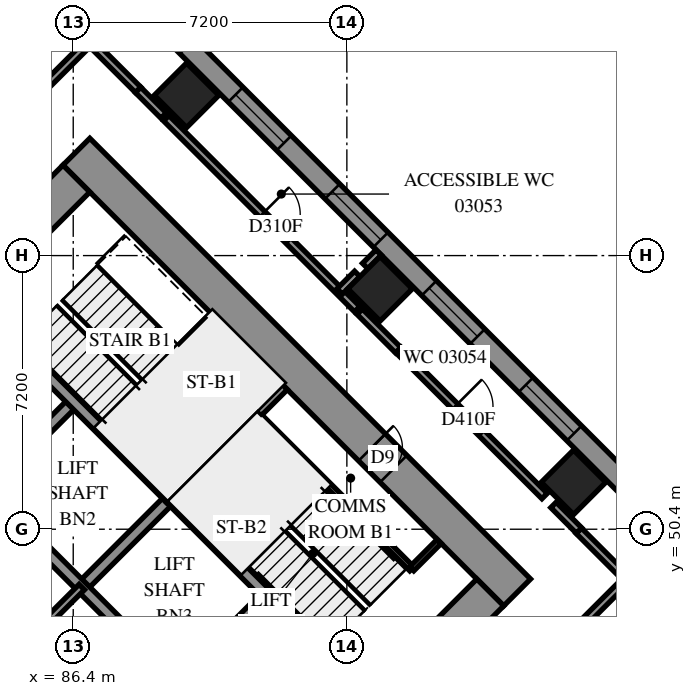
"""IFC4 building model, lengths in metres.
Left out: names, types, materials, properties, quantities, classifications, styles, units other than length and angle.
Written with IfcOpenShell. Run it as: python <this file> out.ifc"""

import sys

from ifc_helpers import new_model, si_unit, direction, frame, frame_2d, origin, origin_2d, place, context, subcontext, project, spatial, polyline, rectangle, outline, extrude, element, fill, save


model = new_model("IFC4")
c1 = context("Model", 3, precision=1e-05, world=origin(), true_north=direction((0.0, 1.0)))
c2 = subcontext(c1, "Body", "Model", "MODEL_VIEW")
j1 = project(units=[si_unit("LENGTHUNIT", "METRE"), si_unit("PLANEANGLEUNIT", "RADIAN")], contexts=[c1])
p1 = place(None, origin())
s1 = spatial("IfcSite", under=j1, at=p1, CompositionType="ELEMENT")
p2 = place(p1, origin())
s2 = spatial("IfcBuilding", under=s1, at=p2, CompositionType="ELEMENT")
p3 = place(p2, frame((0.0, 0.0, 14.4)))
s3 = spatial("IfcBuildingStorey", under=s2, at=p3, CompositionType="ELEMENT", Elevation=14.4)
for number, where, z_axis, x_axis in (
    (1, (89.382, 61.818, 0.0), (0.0, 0.0, 1.0), (0.707, -0.707, 0.0)),
    (2, (94.474, 56.727, 0.0), (0.0, 0.0, 1.0), (0.707, -0.707, 0.0)),
    (3, (99.565, 51.635, 0.0), (0.0, 0.0, 1.0), (0.707, -0.707, 0.0)),
):
    element("IfcColumn", number, at=place(p3, frame(where, z_axis=z_axis, x_axis=x_axis)), inside=s3, PredefinedType="COLUMN", context=c2, shape_type="SweptSolid", body=[
        extrude(rectangle(XDim=1.2, YDim=1.2, at=origin_2d()), origin(), (0.0, 0.0, 1.0), 3.8),
    ])
p4 = place(p3, frame((75.594, 49.443, -0.4), z_axis=(0.0, 0.0, 1.0), x_axis=(0.7071037324, -0.70710983, 0.0)))
e4 = element("IfcWall", 4, at=p4, inside=s3, PredefinedType="SHEAR", context=c2, shape_type="SweptSolid", body=[
    extrude(rectangle(XDim=16.4, YDim=1.0, at=frame_2d((8.2, 0.0))), origin(), (0.0, 0.0, 1.0), 3.5),
])
p5 = place(p3, frame((86.483, 60.333, -0.4), z_axis=(0.0, 0.0, 1.0), x_axis=(0.70710983, -0.7071037324, 0.0)))
e5 = element("IfcWall", 5, at=p5, inside=s3, PredefinedType="SHEAR", context=c2, shape_type="SweptSolid", body=[
    extrude(rectangle(XDim=16.4, YDim=1.0, at=frame_2d((8.2, 0.0))), origin(), (0.0, 0.0, 1.0), 3.5),
])
p6 = place(p5, frame((11.0, 0.0, 0.4)))
e6 = element("IfcOpeningElement", 6, at=p6, cuts=e5, PredefinedType="OPENING", context=c2, shape_type="SweptSolid", body=[
    extrude(rectangle(XDim=0.8, YDim=2.1, at=frame_2d((0.4, 1.05))), frame((0.0, 0.51, 0.0), z_axis=(0.0, -1.0, 0.0), x_axis=(1.0, 0.0, 0.0)), (0.0, 0.0, 1.0), 1.02),
])
p7 = place(p3, frame((76.301, 49.443, -0.4), z_axis=(0.0, 0.0, 1.0), x_axis=(0.7071067812, 0.7071067812, 0.0)))
e7 = element("IfcWall", 7, at=p7, inside=s3, PredefinedType="SHEAR", context=c2, shape_type="SweptSolid", body=[
    extrude(rectangle(XDim=14.4, YDim=1.0, at=frame_2d((7.2, 0.0))), origin(), (0.0, 0.0, 1.0), 3.5),
])
p8 = place(p7, frame((4.55, 0.0, 0.4)))
e8 = element("IfcOpeningElement", 8, at=p8, cuts=e7, PredefinedType="OPENING", context=c2, shape_type="SweptSolid", body=[
    extrude(rectangle(XDim=1.1, YDim=2.1, at=frame_2d((0.55, 1.05))), frame((0.0, 0.51, 0.0), z_axis=(0.0, -1.0, 0.0), x_axis=(1.0, 0.0, 0.0)), (0.0, 0.0, 1.0), 1.02),
])
p9 = place(p7, frame((11.35, 0.0, 0.4)))
e9 = element("IfcOpeningElement", 9, at=p9, cuts=e7, PredefinedType="OPENING", context=c2, shape_type="SweptSolid", body=[
    extrude(rectangle(XDim=1.1, YDim=2.1, at=frame_2d((0.55, 1.05))), frame((0.0, 0.51, 0.0), z_axis=(0.0, -1.0, 0.0), x_axis=(1.0, 0.0, 0.0)), (0.0, 0.0, 1.0), 1.02),
])
p10 = place(p3, frame((87.19, 38.554, -0.4), z_axis=(0.0, 0.0, 1.0), x_axis=(0.707103309, 0.7071102534, 0.0)))
e10 = element("IfcWall", 10, at=p10, inside=s3, PredefinedType="SHEAR", context=c2, shape_type="SweptSolid", body=[
    extrude(rectangle(XDim=14.4, YDim=1.0, at=frame_2d((7.2, 0.0))), origin(), (0.0, 0.0, 1.0), 3.5),
])
p11 = place(p10, frame((4.55, 0.0, 0.4)))
e11 = element("IfcOpeningElement", 11, at=p11, cuts=e10, PredefinedType="OPENING", context=c2, shape_type="SweptSolid", body=[
    extrude(rectangle(XDim=1.1, YDim=2.1, at=frame_2d((0.55, 1.05))), frame((0.0, 0.51, 0.0), z_axis=(0.0, -1.0, 0.0), x_axis=(1.0, 0.0, 0.0)), (0.0, 0.0, 1.0), 1.02),
])
p12 = place(p10, frame((11.35, 0.0, 0.4)))
e12 = element("IfcOpeningElement", 12, at=p12, cuts=e10, PredefinedType="OPENING", context=c2, shape_type="SweptSolid", body=[
    extrude(rectangle(XDim=1.1, YDim=2.1, at=frame_2d((0.55, 1.05))), frame((0.0, 0.51, 0.0), z_axis=(0.0, -1.0, 0.0), x_axis=(1.0, 0.0, 0.0)), (0.0, 0.0, 1.0), 1.02),
])
p13 = place(p3, frame((84.079, 51.423, 0.0), z_axis=(0.0, 0.0, 1.0), x_axis=(0.7071219326, 0.7070916295, 0.0)))
e13 = element("IfcWall", 13, at=p13, inside=s3, PredefinedType="SOLIDWALL", context=c2, shape_type="SweptSolid", body=[
    extrude(rectangle(XDim=3.3, YDim=0.3, at=frame_2d((1.65, 0.0))), origin(), (0.0, 0.0, 1.0), 3.8),
])
for number, where, z_axis, x_axis in (
    (14, (86.625, 48.878, 0.0), (0.0, 0.0, 1.0), (0.707, 0.707, 0.0)),
    (15, (89.17, 46.332, 0.0), (0.0, 0.0, 1.0), (0.707, 0.707, 0.0)),
):
    element("IfcWall", number, at=place(p3, frame(where, z_axis=z_axis, x_axis=x_axis)), inside=s3, PredefinedType="SOLIDWALL", context=c2, shape_type="SweptSolid", body=[
        extrude(rectangle(XDim=3.3, YDim=0.3, at=frame_2d((1.65, 0.0))), origin(), (0.0, 0.0, 1.0), 3.8),
    ])
p14 = place(p3, frame((78.988, 51.423, 0.0), z_axis=(0.0, 0.0, 1.0), x_axis=(0.7071067812, -0.7071067812, 0.0)))
e16 = element("IfcWall", 16, at=p14, inside=s3, PredefinedType="SOLIDWALL", context=c2, shape_type="SweptSolid", body=[
    extrude(rectangle(XDim=14.4, YDim=0.3, at=frame_2d((7.2, 0.0))), origin(), (0.0, 0.0, 1.0), 3.8),
])
p15 = place(p14, frame((1.25, 0.0, 0.0)))
e17 = element("IfcOpeningElement", 17, at=p15, cuts=e16, PredefinedType="OPENING", context=c2, shape_type="SweptSolid", body=[
    extrude(rectangle(XDim=1.1, YDim=2.1, at=frame_2d((0.55, 1.05))), frame((0.0, 0.16, 0.0), z_axis=(0.0, -1.0, 0.0), x_axis=(1.0, 0.0, 0.0)), (0.0, 0.0, 1.0), 0.32),
])
p16 = place(p14, frame((4.85, 0.0, 0.0)))
e18 = element("IfcOpeningElement", 18, at=p16, cuts=e16, PredefinedType="OPENING", context=c2, shape_type="SweptSolid", body=[
    extrude(rectangle(XDim=1.1, YDim=2.1, at=frame_2d((0.55, 1.05))), frame((0.0, 0.16, 0.0), z_axis=(0.0, -1.0, 0.0), x_axis=(1.0, 0.0, 0.0)), (0.0, 0.0, 1.0), 0.32),
])
p17 = place(p14, frame((8.45, 0.0, 0.0)))
e19 = element("IfcOpeningElement", 19, at=p17, cuts=e16, PredefinedType="OPENING", context=c2, shape_type="SweptSolid", body=[
    extrude(rectangle(XDim=1.1, YDim=2.1, at=frame_2d((0.55, 1.05))), frame((0.0, 0.16, 0.0), z_axis=(0.0, -1.0, 0.0), x_axis=(1.0, 0.0, 0.0)), (0.0, 0.0, 1.0), 0.32),
])
p18 = place(p14, frame((12.05, 0.0, 0.0)))
e20 = element("IfcOpeningElement", 20, at=p18, cuts=e16, PredefinedType="OPENING", context=c2, shape_type="SweptSolid", body=[
    extrude(rectangle(XDim=1.1, YDim=2.1, at=frame_2d((0.55, 1.05))), frame((0.0, 0.16, 0.0), z_axis=(0.0, -1.0, 0.0), x_axis=(1.0, 0.0, 0.0)), (0.0, 0.0, 1.0), 0.32),
])
p19 = place(p3, frame((81.534, 53.969, 0.0), z_axis=(0.0, 0.0, 1.0), x_axis=(0.707103309, -0.7071102534, 0.0)))
e21 = element("IfcWall", 21, at=p19, inside=s3, PredefinedType="SOLIDWALL", context=c2, shape_type="SweptSolid", body=[
    extrude(rectangle(XDim=14.4, YDim=0.3, at=frame_2d((7.2, 0.0))), origin(), (0.0, 0.0, 1.0), 3.8),
])
p20 = place(p19, frame((12.05, 0.0, 0.0)))
e22 = element("IfcOpeningElement", 22, at=p20, cuts=e21, PredefinedType="OPENING", context=c2, shape_type="SweptSolid", body=[
    extrude(rectangle(XDim=1.1, YDim=2.1, at=frame_2d((0.55, 1.05))), frame((0.0, 0.16, 0.0), z_axis=(0.0, -1.0, 0.0), x_axis=(1.0, 0.0, 0.0)), (0.0, 0.0, 1.0), 0.32),
])
for number, where, z_axis, x_axis in (
    (23, (83.867, 56.302, 0.0), (0.0, 0.0, 1.0), (0.707, -0.707, 0.0)),
    (24, (88.958, 51.211, 0.0), (0.0, 0.0, 1.0), (0.707, -0.707, 0.0)),
):
    element("IfcWall", number, at=place(p3, frame(where, z_axis=z_axis, x_axis=x_axis)), inside=s3, PredefinedType="SOLIDWALL", context=c2, shape_type="SweptSolid", body=[
        extrude(rectangle(XDim=7.2, YDim=0.3, at=frame_2d((3.6, 0.0))), origin(), (0.0, 0.0, 1.0), 3.8),
    ])
p21 = place(p3, frame((88.958, 51.211, 0.0), z_axis=(0.0, 0.0, 1.0), x_axis=(0.7071067812, 0.7071067812, 0.0)))
e25 = element("IfcWall", 25, at=p21, inside=s3, PredefinedType="SOLIDWALL", context=c2, shape_type="SweptSolid", body=[
    extrude(rectangle(XDim=4.2, YDim=0.3, at=frame_2d((2.1, 0.0))), origin(), (0.0, 0.0, 1.0), 3.8),
])
p22 = place(p3, frame((117.843, 34.665, 0.0), z_axis=(0.0, 0.0, 1.0), x_axis=(-0.7071067812, 0.7071067812, 0.0)))
e26 = element("IfcWall", 26, at=p22, inside=s3, PredefinedType="SOLIDWALL", context=c2, shape_type="SweptSolid", body=[
    extrude(outline(polyline([(-0.275, -0.275), (54.222, -0.275), (53.994, 0.275), (0.275, 0.275), (-0.275, -0.275)])), origin(), (0.0, 0.0, 1.0), 3.8),
])
p23 = place(p22, frame((0.8, 0.0, 0.7)))
e27 = element("IfcOpeningElement", 27, at=p23, cuts=e26, PredefinedType="OPENING", context=c2, shape_type="SweptSolid", body=[
    extrude(rectangle(XDim=1.8, YDim=2.6, at=frame_2d((0.9, 1.3))), frame((0.0, 0.285, 0.0), z_axis=(0.0, -1.0, 0.0), x_axis=(1.0, 0.0, 0.0)), (0.0, 0.0, 1.0), 0.57),
])
p24 = place(p22, frame((4.225, 0.0, 0.7)))
e28 = element("IfcOpeningElement", 28, at=p24, cuts=e26, PredefinedType="OPENING", context=c2, shape_type="SweptSolid", body=[
    extrude(rectangle(XDim=1.8, YDim=2.6, at=frame_2d((0.9, 1.3))), frame((0.0, 0.285, 0.0), z_axis=(0.0, -1.0, 0.0), x_axis=(1.0, 0.0, 0.0)), (0.0, 0.0, 1.0), 0.57),
])
p25 = place(p22, frame((7.825, 0.0, 0.7)))
e29 = element("IfcOpeningElement", 29, at=p25, cuts=e26, PredefinedType="OPENING", context=c2, shape_type="SweptSolid", body=[
    extrude(rectangle(XDim=1.8, YDim=2.6, at=frame_2d((0.9, 1.3))), frame((0.0, 0.285, 0.0), z_axis=(0.0, -1.0, 0.0), x_axis=(1.0, 0.0, 0.0)), (0.0, 0.0, 1.0), 0.57),
])
p26 = place(p22, frame((11.425, 0.0, 0.7)))
e30 = element("IfcOpeningElement", 30, at=p26, cuts=e26, PredefinedType="OPENING", context=c2, shape_type="SweptSolid", body=[
    extrude(rectangle(XDim=1.8, YDim=2.6, at=frame_2d((0.9, 1.3))), frame((0.0, 0.285, 0.0), z_axis=(0.0, -1.0, 0.0), x_axis=(1.0, 0.0, 0.0)), (0.0, 0.0, 1.0), 0.57),
])
p27 = place(p22, frame((15.025, 0.0, 0.7)))
e31 = element("IfcOpeningElement", 31, at=p27, cuts=e26, PredefinedType="OPENING", context=c2, shape_type="SweptSolid", body=[
    extrude(rectangle(XDim=1.8, YDim=2.6, at=frame_2d((0.9, 1.3))), frame((0.0, 0.285, 0.0), z_axis=(0.0, -1.0, 0.0), x_axis=(1.0, 0.0, 0.0)), (0.0, 0.0, 1.0), 0.57),
])
p28 = place(p22, frame((18.625, 0.0, 0.7)))
e32 = element("IfcOpeningElement", 32, at=p28, cuts=e26, PredefinedType="OPENING", context=c2, shape_type="SweptSolid", body=[
    extrude(rectangle(XDim=1.8, YDim=2.6, at=frame_2d((0.9, 1.3))), frame((0.0, 0.285, 0.0), z_axis=(0.0, -1.0, 0.0), x_axis=(1.0, 0.0, 0.0)), (0.0, 0.0, 1.0), 0.57),
])
p29 = place(p22, frame((22.225, 0.0, 0.7)))
e33 = element("IfcOpeningElement", 33, at=p29, cuts=e26, PredefinedType="OPENING", context=c2, shape_type="SweptSolid", body=[
    extrude(rectangle(XDim=1.8, YDim=2.6, at=frame_2d((0.9, 1.3))), frame((0.0, 0.285, 0.0), z_axis=(0.0, -1.0, 0.0), x_axis=(1.0, 0.0, 0.0)), (0.0, 0.0, 1.0), 0.57),
])
p30 = place(p22, frame((25.825, 0.0, 0.7)))
e34 = element("IfcOpeningElement", 34, at=p30, cuts=e26, PredefinedType="OPENING", context=c2, shape_type="SweptSolid", body=[
    extrude(rectangle(XDim=1.8, YDim=2.6, at=frame_2d((0.9, 1.3))), frame((0.0, 0.285, 0.0), z_axis=(0.0, -1.0, 0.0), x_axis=(1.0, 0.0, 0.0)), (0.0, 0.0, 1.0), 0.57),
])
p31 = place(p22, frame((29.425, 0.0, 0.7)))
e35 = element("IfcOpeningElement", 35, at=p31, cuts=e26, PredefinedType="OPENING", context=c2, shape_type="SweptSolid", body=[
    extrude(rectangle(XDim=1.8, YDim=2.6, at=frame_2d((0.9, 1.3))), frame((0.0, 0.285, 0.0), z_axis=(0.0, -1.0, 0.0), x_axis=(1.0, 0.0, 0.0)), (0.0, 0.0, 1.0), 0.57),
])
p32 = place(p22, frame((33.025, 0.0, 0.7)))
e36 = element("IfcOpeningElement", 36, at=p32, cuts=e26, PredefinedType="OPENING", context=c2, shape_type="SweptSolid", body=[
    extrude(rectangle(XDim=1.8, YDim=2.6, at=frame_2d((0.9, 1.3))), frame((0.0, 0.285, 0.0), z_axis=(0.0, -1.0, 0.0), x_axis=(1.0, 0.0, 0.0)), (0.0, 0.0, 1.0), 0.57),
])
p33 = place(p22, frame((36.625, 0.0, 0.7)))
e37 = element("IfcOpeningElement", 37, at=p33, cuts=e26, PredefinedType="OPENING", context=c2, shape_type="SweptSolid", body=[
    extrude(rectangle(XDim=1.8, YDim=2.6, at=frame_2d((0.9, 1.3))), frame((0.0, 0.285, 0.0), z_axis=(0.0, -1.0, 0.0), x_axis=(1.0, 0.0, 0.0)), (0.0, 0.0, 1.0), 0.57),
])
p34 = place(p22, frame((40.225, 0.0, 0.7)))
e38 = element("IfcOpeningElement", 38, at=p34, cuts=e26, PredefinedType="OPENING", context=c2, shape_type="SweptSolid", body=[
    extrude(rectangle(XDim=1.8, YDim=2.6, at=frame_2d((0.9, 1.3))), frame((0.0, 0.285, 0.0), z_axis=(0.0, -1.0, 0.0), x_axis=(1.0, 0.0, 0.0)), (0.0, 0.0, 1.0), 0.57),
])
p35 = place(p22, frame((43.825, 0.0, 0.7)))
e39 = element("IfcOpeningElement", 39, at=p35, cuts=e26, PredefinedType="OPENING", context=c2, shape_type="SweptSolid", body=[
    extrude(rectangle(XDim=1.8, YDim=2.6, at=frame_2d((0.9, 1.3))), frame((0.0, 0.285, 0.0), z_axis=(0.0, -1.0, 0.0), x_axis=(1.0, 0.0, 0.0)), (0.0, 0.0, 1.0), 0.57),
])
p36 = place(p22, frame((47.425, 0.0, 0.7)))
e40 = element("IfcOpeningElement", 40, at=p36, cuts=e26, PredefinedType="OPENING", context=c2, shape_type="SweptSolid", body=[
    extrude(rectangle(XDim=1.8, YDim=2.6, at=frame_2d((0.9, 1.3))), frame((0.0, 0.285, 0.0), z_axis=(0.0, -1.0, 0.0), x_axis=(1.0, 0.0, 0.0)), (0.0, 0.0, 1.0), 0.57),
])
p37 = place(p22, frame((51.06, 0.0, 0.7)))
e41 = element("IfcOpeningElement", 41, at=p37, cuts=e26, PredefinedType="OPENING", context=c2, shape_type="SweptSolid", body=[
    extrude(rectangle(XDim=1.8, YDim=2.6, at=frame_2d((0.9, 1.3))), frame((0.0, 0.285, 0.0), z_axis=(0.0, -1.0, 0.0), x_axis=(1.0, 0.0, 0.0)), (0.0, 0.0, 1.0), 0.57),
])
p38 = place(p3, frame((91.313, 53.354, 0.0), z_axis=(0.0, 0.0, 1.0), x_axis=(0.7071067812, -0.7071067812, 0.0)))
e42 = element("IfcWall", 42, at=p38, inside=s3, PredefinedType="PARTITIONING", context=c2, shape_type="SweptSolid", body=[
    extrude(rectangle(XDim=5.65, YDim=0.15, at=frame_2d((2.825, 0.0))), origin(), (0.0, 0.0, 1.0), 3.8),
])
p39 = place(p3, frame((95.308, 49.358, 0.0), z_axis=(0.0, 0.0, 1.0), x_axis=(0.70705776, 0.707155799, 0.0)))
e43 = element("IfcWall", 43, at=p39, inside=s3, PredefinedType="PARTITIONING", context=c2, shape_type="SweptSolid", body=[
    extrude(rectangle(XDim=1.02, YDim=0.15, at=frame_2d((0.51, 0.0))), origin(), (0.0, 0.0, 1.0), 3.8),
])
p40 = place(p3, frame((84.079, 46.332, 0.0), z_axis=(0.0, 0.0, 1.0), x_axis=(0.7071067812, 0.7071067812, 0.0)))
e44 = element("IfcWall", 44, at=p40, inside=s3, PredefinedType="PARTITIONING", context=c2, shape_type="SweptSolid", body=[
    extrude(rectangle(XDim=3.6, YDim=0.2, at=frame_2d((1.8, 0.0))), origin(), (0.0, 0.0, 1.0), 3.8),
])
p41 = place(p3, frame((95.109, 42.091, 0.0), z_axis=(0.0, 0.0, 1.0), x_axis=(0.7071115207, 0.7071020416, 0.0)))
e45 = element("IfcWall", 45, at=p41, inside=s3, PredefinedType="PARTITIONING", context=c2, shape_type="SweptSolid", body=[
    extrude(rectangle(XDim=10.55, YDim=0.2, at=frame_2d((5.275, 0.0))), origin(), (0.0, 0.0, 1.0), 3.8),
])
p42 = place(p3, frame((94.544, 42.656, 0.0), z_axis=(0.0, 0.0, 1.0), x_axis=(0.7071067812, 0.7071067812, 0.0)))
e46 = element("IfcWall", 46, at=p42, inside=s3, PredefinedType="PARTITIONING", context=c2, shape_type="SweptSolid", body=[
    extrude(rectangle(XDim=9.099, YDim=0.2, at=frame_2d((4.55, 0.0))), origin(), (0.0, 0.0, 1.0), 3.8),
])
p43 = place(p3, frame((81.053, 57.445, 0.0), z_axis=(0.0, 0.0, 1.0), x_axis=(0.7069845395, 0.7072290017, 0.0)))
e47 = element("IfcWall", 47, at=p43, inside=s3, PredefinedType="PARTITIONING", context=c2, shape_type="SweptSolid", body=[
    extrude(rectangle(XDim=8.181, YDim=0.2, at=frame_2d((4.091, 0.0))), origin(), (0.0, 0.0, 1.0), 3.8),
])
p44 = place(p3, frame((88.847, 61.215, 0.0), z_axis=(0.0, 0.0, 1.0), x_axis=(0.7071067812, -0.7071067812, 0.0)))
e48 = element("IfcWall", 48, at=p44, inside=s3, PredefinedType="PARTITIONING", context=c2, shape_type="SweptSolid", body=[
    extrude(rectangle(XDim=7.105, YDim=0.2, at=frame_2d((3.553, 0.0))), origin(), (0.0, 0.0, 1.0), 3.8),
])
p45 = place(p44, frame((3.571, 0.0, 0.0)))
e49 = element("IfcOpeningElement", 49, at=p45, cuts=e48, PredefinedType="OPENING", context=c2, shape_type="SweptSolid", body=[
    extrude(rectangle(XDim=1.0, YDim=2.1, at=frame_2d((0.5, 1.05))), frame((0.0, 0.11, 0.0), z_axis=(0.0, -1.0, 0.0), x_axis=(1.0, 0.0, 0.0)), (0.0, 0.0, 1.0), 0.22),
])
p46 = place(p3, frame((94.955, 55.119, 0.0), z_axis=(0.0, 0.0, 1.0), x_axis=(0.7072721884, -0.7069413352, 0.0)))
e50 = element("IfcWall", 50, at=p46, inside=s3, PredefinedType="PARTITIONING", context=c2, shape_type="SweptSolid", body=[
    extrude(rectangle(XDim=5.441, YDim=0.2, at=frame_2d((2.72, 0.0))), origin(), (0.0, 0.0, 1.0), 3.8),
])
p47 = place(p46, frame((2.106, 0.0, 0.0)))
e51 = element("IfcOpeningElement", 51, at=p47, cuts=e50, PredefinedType="OPENING", context=c2, shape_type="SweptSolid", body=[
    extrude(rectangle(XDim=1.0, YDim=2.1, at=frame_2d((0.5, 1.05))), frame((0.0, 0.11, 0.0), z_axis=(0.0, -1.0, 0.0), x_axis=(1.0, 0.0, 0.0)), (0.0, 0.0, 1.0), 0.22),
])
p48 = place(p3, frame((86.835, 63.231, 0.0), z_axis=(0.0, 0.0, 1.0), x_axis=(0.7076620277, -0.7065510983, 0.0)))
e52 = element("IfcWall", 52, at=p48, inside=s3, PredefinedType="PARTITIONING", context=c2, shape_type="SweptSolid", body=[
    extrude(rectangle(XDim=1.8, YDim=0.2, at=frame_2d((0.9, 0.0))), origin(), (0.0, 0.0, 1.0), 3.8),
])
p49 = place(p3, frame((99.703, 50.359, 0.0), z_axis=(0.0, 0.0, 1.0), x_axis=(0.7071067812, -0.7071067812, 0.0)))
e53 = element("IfcWall", 53, at=p49, inside=s3, PredefinedType="PARTITIONING", context=c2, shape_type="SweptSolid", body=[
    extrude(rectangle(XDim=1.799, YDim=0.2, at=frame_2d((0.899, 0.0))), origin(), (0.0, 0.0, 1.0), 3.8),
])
p50 = place(p3, frame((93.939, 56.123, 0.0), z_axis=(0.0, 0.0, 1.0), x_axis=(0.7071067812, -0.7071067812, 0.0)))
e54 = element("IfcWall", 54, at=p50, inside=s3, PredefinedType="PARTITIONING", context=c2, shape_type="SweptSolid", body=[
    extrude(rectangle(XDim=1.428, YDim=0.2, at=frame_2d((0.714, 0.0))), origin(), (0.0, 0.0, 1.0), 3.8),
])
for number, where, z_axis, x_axis in (
    (55, (88.108, 61.958, 0.0), (0.0, 0.0, 1.0), (0.706, -0.708, 0.0)),
    (56, (99.037, 51.039, 0.0), (0.0, 0.0, 1.0), (0.706, -0.708, 0.0)),
):
    element("IfcWall", number, at=place(p3, frame(where, z_axis=z_axis, x_axis=x_axis)), inside=s3, PredefinedType="PARTITIONING", context=c2, shape_type="SweptSolid", body=[
        extrude(rectangle(XDim=0.952, YDim=0.2, at=frame_2d((0.476, 0.0))), origin(), (0.0, 0.0, 1.0), 3.8),
    ])
p51 = place(p3, frame((93.412, 56.656, 0.0), z_axis=(0.0, 0.0, 1.0), x_axis=(0.7071067812, 0.7071067812, 0.0)))
e57 = element("IfcWall", 57, at=p51, inside=s3, PredefinedType="PARTITIONING", context=c2, shape_type="SweptSolid", body=[
    extrude(rectangle(XDim=0.653, YDim=0.2, at=frame_2d((0.327, 0.0))), origin(), (0.0, 0.0, 1.0), 3.8),
])
p52 = place(p3, frame((94.082, 57.326, 0.0), z_axis=(0.0, 0.0, 1.0), x_axis=(0.7071067812, 0.7071067812, 0.0)))
e58 = element("IfcWall", 58, at=p52, inside=s3, PredefinedType="PARTITIONING", context=c2, shape_type="SweptSolid", body=[
    extrude(rectangle(XDim=0.503, YDim=0.2, at=frame_2d((0.252, 0.0))), origin(), (0.0, 0.0, 1.0), 3.8),
])
p53 = place(p30, origin())
e59 = element("IfcWindow", 59, at=p53, inside=s3, PartitioningType="SINGLE_PANEL", PredefinedType="WINDOW", context=c2, shape_type="SweptSolid", body=[
    extrude(rectangle(XDim=1.8, YDim=2.6, at=frame_2d((0.9, 1.3))), frame((0.0, 0.155, 0.0), z_axis=(0.0, -1.0, 0.0), x_axis=(1.0, 0.0, 0.0)), (0.0, 0.0, 1.0), 0.06),
])
fill(e34, e59)
p54 = place(p31, origin())
e60 = element("IfcWindow", 60, at=p54, inside=s3, PartitioningType="SINGLE_PANEL", PredefinedType="WINDOW", context=c2, shape_type="SweptSolid", body=[
    extrude(rectangle(XDim=1.8, YDim=2.6, at=frame_2d((0.9, 1.3))), frame((0.0, 0.155, 0.0), z_axis=(0.0, -1.0, 0.0), x_axis=(1.0, 0.0, 0.0)), (0.0, 0.0, 1.0), 0.06),
])
fill(e35, e60)
p55 = place(p32, origin())
e61 = element("IfcWindow", 61, at=p55, inside=s3, PartitioningType="SINGLE_PANEL", PredefinedType="WINDOW", context=c2, shape_type="SweptSolid", body=[
    extrude(rectangle(XDim=1.8, YDim=2.6, at=frame_2d((0.9, 1.3))), frame((0.0, 0.155, 0.0), z_axis=(0.0, -1.0, 0.0), x_axis=(1.0, 0.0, 0.0)), (0.0, 0.0, 1.0), 0.06),
])
fill(e36, e61)
p56 = place(p33, origin())
e62 = element("IfcWindow", 62, at=p56, inside=s3, PartitioningType="SINGLE_PANEL", PredefinedType="WINDOW", context=c2, shape_type="SweptSolid", body=[
    extrude(rectangle(XDim=1.8, YDim=2.6, at=frame_2d((0.9, 1.3))), frame((0.0, 0.155, 0.0), z_axis=(0.0, -1.0, 0.0), x_axis=(1.0, 0.0, 0.0)), (0.0, 0.0, 1.0), 0.06),
])
fill(e37, e62)
p57 = place(p6, origin())
e63 = element("IfcDoor", 63, at=p57, inside=s3, OperationType="SINGLE_SWING_RIGHT", PredefinedType="DOOR", context=c2, shape_type="SweptSolid", body=[
    extrude(rectangle(XDim=0.8, YDim=2.1, at=frame_2d((0.4, 1.05))), frame((0.0, -0.44, 0.0), z_axis=(0.0, -1.0, 0.0), x_axis=(1.0, 0.0, 0.0)), (0.0, 0.0, 1.0), 0.05),
])
fill(e6, e63)
p58 = place(p45, origin())
e64 = element("IfcDoor", 64, at=p58, inside=s3, OperationType="SINGLE_SWING_LEFT", PredefinedType="DOOR", context=c2, shape_type="SweptSolid", body=[
    extrude(rectangle(XDim=1.0, YDim=2.1, at=frame_2d((0.5, 1.05))), frame((0.0, 0.025, 0.0), z_axis=(0.0, -1.0, 0.0), x_axis=(1.0, 0.0, 0.0)), (0.0, 0.0, 1.0), 0.05),
])
fill(e49, e64)
p59 = place(p47, origin())
e65 = element("IfcDoor", 65, at=p59, inside=s3, OperationType="SINGLE_SWING_LEFT", PredefinedType="DOOR", context=c2, shape_type="SweptSolid", body=[
    extrude(rectangle(XDim=1.0, YDim=2.1, at=frame_2d((0.5, 1.05))), frame((0.0, 0.025, 0.0), z_axis=(0.0, -1.0, 0.0), x_axis=(1.0, 0.0, 0.0)), (0.0, 0.0, 1.0), 0.05),
])
fill(e51, e65)
save(model, sys.argv[1])
